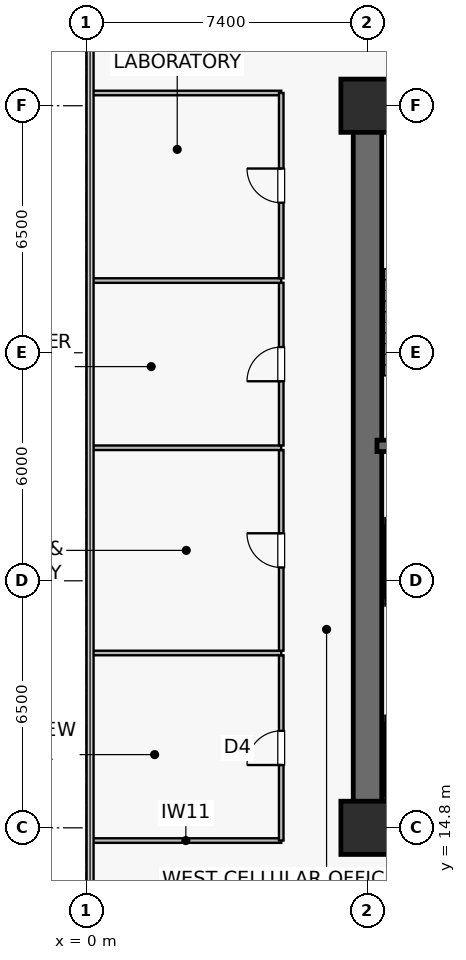
"""IFC4 building model, lengths in metres.
Left out: names, types, materials, properties, quantities, classifications, styles, units other than length and angle.
Written with IfcOpenShell. Run it as: python <this file> out.ifc"""

import sys

from ifc_helpers import new_model, si_unit, direction, frame, frame_2d, origin, origin_2d, place, context, subcontext, project, spatial, rectangle, extrude, source, transform, mapped, element, fill, save


model = new_model("IFC4")
c1 = context("Model", 3, precision=1e-05, world=origin(), true_north=direction((0.0, 1.0)))
c2 = subcontext(c1, "Body", "Model", "MODEL_VIEW")
j1 = project(units=[si_unit("LENGTHUNIT", "METRE"), si_unit("PLANEANGLEUNIT", "RADIAN")], contexts=[c1])
p1 = place(None, origin())
s1 = spatial("IfcSite", under=j1, at=p1, CompositionType="ELEMENT")
p2 = place(p1, origin())
s2 = spatial("IfcBuilding", under=s1, at=p2, CompositionType="ELEMENT")
p3 = place(p2, frame((0.0, 0.0, 90.8)))
s3 = spatial("IfcBuildingStorey", under=s2, at=p3, CompositionType="ELEMENT", Elevation=90.8)
p4 = place(p3, frame((7.025, 14.8, 0.0), z_axis=(0.0, 0.0, 1.0), x_axis=(1.0, 0.0, 0.0)))
e1 = element("IfcWall", 1, at=p4, inside=s3, PredefinedType="SHEAR", context=c2, shape_type="SweptSolid", body=[
    extrude(rectangle(XDim=15.55, YDim=0.75, at=frame_2d((7.775, 0.0))), origin(), (0.0, 0.0, 1.0), 3.78),
])
p5 = place(p3, frame((7.025, 33.8, 0.0), z_axis=(0.0, 0.0, 1.0), x_axis=(1.0, 0.0, 0.0)))
e2 = element("IfcWall", 2, at=p5, inside=s3, PredefinedType="SHEAR", context=c2, shape_type="SweptSolid", body=[
    extrude(rectangle(XDim=15.55, YDim=0.75, at=frame_2d((7.775, 0.0))), origin(), (0.0, 0.0, 1.0), 3.78),
])
p6 = place(p5, frame((6.875, 0.0, 0.0)))
e3 = element("IfcOpeningElement", 3, at=p6, cuts=e2, PredefinedType="OPENING", context=c2, shape_type="SweptSolid", body=[
    extrude(rectangle(XDim=0.95, YDim=2.15, at=frame_2d((0.475, 1.075))), frame((0.0, 0.385, 0.0), z_axis=(0.0, -1.0, 0.0), x_axis=(1.0, 0.0, 0.0)), (0.0, 0.0, 1.0), 0.77),
])
p7 = place(p5, frame((11.94, 0.0, 0.0)))
e4 = element("IfcOpeningElement", 4, at=p7, cuts=e2, PredefinedType="OPENING", context=c2, shape_type="SweptSolid", body=[
    extrude(rectangle(XDim=0.95, YDim=2.15, at=frame_2d((0.475, 1.075))), frame((0.0, 0.385, 0.0), z_axis=(0.0, -1.0, 0.0), x_axis=(1.0, 0.0, 0.0)), (0.0, 0.0, 1.0), 0.77),
])
p8 = place(p3, frame((7.4, 15.175, 0.0), z_axis=(0.0, 0.0, 1.0), x_axis=(0.0, 1.0, 0.0)))
e5 = element("IfcWall", 5, at=p8, inside=s3, PredefinedType="SHEAR", context=c2, shape_type="SweptSolid", body=[
    extrude(rectangle(XDim=18.25, YDim=0.75, at=frame_2d((9.125, 0.0))), origin(), (0.0, 0.0, 1.0), 3.78),
])
p9 = place(p3, frame((7.65, 24.85, 0.0), z_axis=(0.0, 0.0, 1.0), x_axis=(1.0, 0.0, 0.0)))
e6 = element("IfcWall", 6, at=p9, inside=s3, PredefinedType="SHEAR", context=c2, shape_type="SweptSolid", body=[
    extrude(rectangle(XDim=3.8, YDim=0.3, at=frame_2d((1.9, 0.0))), origin(), (0.0, 0.0, 1.0), 3.78),
])
p10 = place(p3, frame((7.73, 33.4, 0.0), z_axis=(0.0, 0.0, 1.0), x_axis=(1.0, 0.0, 0.0)))
e7 = element("IfcWall", 7, at=p10, inside=s3, PredefinedType="SOLIDWALL", context=c2, shape_type="SweptSolid", body=[
    extrude(rectangle(XDim=3.72, YDim=0.12, at=frame_2d((1.86, 0.0))), origin(), (0.0, 0.0, 1.0), 3.78),
])
m1 = source(origin(), c2, "Body", "SweptSolid", [
    extrude(rectangle(XDim=1.4, YDim=1.4, at=origin_2d()), origin(), (0.0, 0.0, 1.0), 4.1),
])
for number, where, z_axis, x_axis in (
    (8, (7.4, 14.8, 0.0), (0.0, 0.0, 1.0), (1.0, 0.0, 0.0)),
    (9, (7.4, 33.8, 0.0), (0.0, 0.0, 1.0), (1.0, 0.0, 0.0)),
):
    element("IfcColumn", number, at=place(p3, frame(where, z_axis=z_axis, x_axis=x_axis)), inside=s3, PredefinedType="COLUMN", context=c2, shape_type="MappedRepresentation", body=[
        mapped(m1, transform((0.0, 0.0, 0.0), scale=1.0)),
    ])
p11 = place(p3, frame((7.87, 17.65, 0.0), z_axis=(0.0, 0.0, 1.0), x_axis=(1.0, 0.0, 0.0)))
e10 = element("IfcWall", 10, at=p11, inside=s3, PredefinedType="SOLIDWALL", context=c2, shape_type="SweptSolid", body=[
    extrude(rectangle(XDim=2.26, YDim=0.2, at=frame_2d((1.13, 0.0))), origin(), (0.0, 0.0, 1.0), 3.78),
])
p12 = place(p11, frame((0.58, 0.0, 0.0)))
e11 = element("IfcOpeningElement", 11, at=p12, cuts=e10, PredefinedType="OPENING", context=c2, shape_type="SweptSolid", body=[
    extrude(rectangle(XDim=1.1, YDim=2.22, at=frame_2d((0.55, 1.11))), frame((0.0, 0.11, 0.0), z_axis=(0.0, -1.0, 0.0), x_axis=(1.0, 0.0, 0.0)), (0.0, 0.0, 1.0), 0.22),
])
p13 = place(p3, frame((7.87, 15.55, 0.0), z_axis=(0.0, 0.0, 1.0), x_axis=(1.0, 0.0, 0.0)))
e12 = element("IfcWall", 12, at=p13, inside=s3, PredefinedType="SOLIDWALL", context=c2, shape_type="SweptSolid", body=[
    extrude(rectangle(XDim=2.26, YDim=0.2, at=frame_2d((1.13, 0.0))), origin(), (0.0, 0.0, 1.0), 3.78),
])
p14 = place(p3, frame((7.95, 15.65, 0.0), z_axis=(0.0, 0.0, 1.0), x_axis=(0.0, 1.0, 0.0)))
e13 = element("IfcWall", 13, at=p14, inside=s3, PredefinedType="SOLIDWALL", context=c2, shape_type="SweptSolid", body=[
    extrude(rectangle(XDim=1.9, YDim=0.18, at=frame_2d((0.95, 0.0))), origin(), (0.0, 0.0, 1.0), 3.78),
])
for number, where, z_axis, x_axis in (
    (14, (7.87, 20.75, 0.0), (0.0, 0.0, 1.0), (1.0, 0.0, 0.0)),
    (15, (7.87, 22.85, 0.0), (0.0, 0.0, 1.0), (1.0, 0.0, 0.0)),
):
    element("IfcWall", number, at=place(p3, frame(where, z_axis=z_axis, x_axis=x_axis)), inside=s3, PredefinedType="SOLIDWALL", context=c2, shape_type="SweptSolid", body=[
        extrude(rectangle(XDim=2.26, YDim=0.2, at=frame_2d((1.13, 0.0))), origin(), (0.0, 0.0, 1.0), 3.78),
    ])
p15 = place(p3, frame((7.95, 20.85, 0.0), z_axis=(0.0, 0.0, 1.0), x_axis=(0.0, 1.0, 0.0)))
e16 = element("IfcWall", 16, at=p15, inside=s3, PredefinedType="SOLIDWALL", context=c2, shape_type="SweptSolid", body=[
    extrude(rectangle(XDim=1.9, YDim=0.18, at=frame_2d((0.95, 0.0))), origin(), (0.0, 0.0, 1.0), 3.78),
])
for number, where, z_axis, x_axis in (
    (17, (0.11, 14.465, 0.0), (0.0, 0.0, 1.0), (1.0, 0.0, 0.0)),
    (18, (0.11, 34.135, 0.0), (0.0, 0.0, 1.0), (1.0, 0.0, 0.0)),
):
    element("IfcWall", number, at=place(p3, frame(where, z_axis=z_axis, x_axis=x_axis)), inside=s3, PredefinedType="PARTITIONING", context=c2, shape_type="SweptSolid", body=[
        extrude(rectangle(XDim=5.02, YDim=0.12, at=frame_2d((2.51, 0.0))), origin(), (0.0, 0.0, 1.0), 3.78),
    ])
p16 = place(p3, frame((5.13, 14.465, 0.0), z_axis=(0.0, 0.0, 1.0), x_axis=(0.0, 1.0, 0.0)))
e19 = element("IfcWall", 19, at=p16, inside=s3, PredefinedType="PARTITIONING", context=c2, shape_type="SweptSolid", body=[
    extrude(rectangle(XDim=4.875, YDim=0.12, at=frame_2d((2.438, 0.0))), origin(), (0.0, 0.0, 1.0), 3.78),
])
p17 = place(p16, frame((1.988, 0.0, 0.0)))
e20 = element("IfcOpeningElement", 20, at=p17, cuts=e19, PredefinedType="OPENING", context=c2, shape_type="SweptSolid", body=[
    extrude(rectangle(XDim=0.9, YDim=2.1, at=frame_2d((0.45, 1.05))), frame((0.0, 0.07, 0.0), z_axis=(0.0, -1.0, 0.0), x_axis=(1.0, 0.0, 0.0)), (0.0, 0.0, 1.0), 0.14),
])
p18 = place(p3, frame((0.11, 19.4, 0.0), z_axis=(0.0, 0.0, 1.0), x_axis=(1.0, 0.0, 0.0)))
e21 = element("IfcWall", 21, at=p18, inside=s3, PredefinedType="PARTITIONING", context=c2, shape_type="SweptSolid", body=[
    extrude(rectangle(XDim=5.02, YDim=0.12, at=frame_2d((2.51, 0.0))), origin(), (0.0, 0.0, 1.0), 3.78),
])
p19 = place(p3, frame((5.13, 19.46, 0.0), z_axis=(0.0, 0.0, 1.0), x_axis=(0.0, 1.0, 0.0)))
e22 = element("IfcWall", 22, at=p19, inside=s3, PredefinedType="PARTITIONING", context=c2, shape_type="SweptSolid", body=[
    extrude(rectangle(XDim=5.28, YDim=0.12, at=frame_2d((2.64, 0.0))), origin(), (0.0, 0.0, 1.0), 3.78),
])
p20 = place(p19, frame((2.19, 0.0, 0.0)))
e23 = element("IfcOpeningElement", 23, at=p20, cuts=e22, PredefinedType="OPENING", context=c2, shape_type="SweptSolid", body=[
    extrude(rectangle(XDim=0.9, YDim=2.1, at=frame_2d((0.45, 1.05))), frame((0.0, 0.07, 0.0), z_axis=(0.0, -1.0, 0.0), x_axis=(1.0, 0.0, 0.0)), (0.0, 0.0, 1.0), 0.14),
])
p21 = place(p3, frame((0.11, 24.8, 0.0), z_axis=(0.0, 0.0, 1.0), x_axis=(1.0, 0.0, 0.0)))
e24 = element("IfcWall", 24, at=p21, inside=s3, PredefinedType="PARTITIONING", context=c2, shape_type="SweptSolid", body=[
    extrude(rectangle(XDim=5.02, YDim=0.12, at=frame_2d((2.51, 0.0))), origin(), (0.0, 0.0, 1.0), 3.78),
])
p22 = place(p3, frame((5.13, 24.86, 0.0), z_axis=(0.0, 0.0, 1.0), x_axis=(0.0, 1.0, 0.0)))
e25 = element("IfcWall", 25, at=p22, inside=s3, PredefinedType="PARTITIONING", context=c2, shape_type="SweptSolid", body=[
    extrude(rectangle(XDim=4.28, YDim=0.12, at=frame_2d((2.14, 0.0))), origin(), (0.0, 0.0, 1.0), 3.78),
])
p23 = place(p22, frame((1.69, 0.0, 0.0)))
e26 = element("IfcOpeningElement", 26, at=p23, cuts=e25, PredefinedType="OPENING", context=c2, shape_type="SweptSolid", body=[
    extrude(rectangle(XDim=0.9, YDim=2.1, at=frame_2d((0.45, 1.05))), frame((0.0, 0.07, 0.0), z_axis=(0.0, -1.0, 0.0), x_axis=(1.0, 0.0, 0.0)), (0.0, 0.0, 1.0), 0.14),
])
p24 = place(p3, frame((0.11, 29.2, 0.0), z_axis=(0.0, 0.0, 1.0), x_axis=(1.0, 0.0, 0.0)))
e27 = element("IfcWall", 27, at=p24, inside=s3, PredefinedType="PARTITIONING", context=c2, shape_type="SweptSolid", body=[
    extrude(rectangle(XDim=5.02, YDim=0.12, at=frame_2d((2.51, 0.0))), origin(), (0.0, 0.0, 1.0), 3.78),
])
p25 = place(p3, frame((5.13, 29.26, 0.0), z_axis=(0.0, 0.0, 1.0), x_axis=(0.0, 1.0, 0.0)))
e28 = element("IfcWall", 28, at=p25, inside=s3, PredefinedType="PARTITIONING", context=c2, shape_type="SweptSolid", body=[
    extrude(rectangle(XDim=4.875, YDim=0.12, at=frame_2d((2.438, 0.0))), origin(), (0.0, 0.0, 1.0), 3.78),
])
p26 = place(p25, frame((1.988, 0.0, 0.0)))
e29 = element("IfcOpeningElement", 29, at=p26, cuts=e28, PredefinedType="OPENING", context=c2, shape_type="SweptSolid", body=[
    extrude(rectangle(XDim=0.9, YDim=2.1, at=frame_2d((0.45, 1.05))), frame((0.0, 0.07, 0.0), z_axis=(0.0, -1.0, 0.0), x_axis=(1.0, 0.0, 0.0)), (0.0, 0.0, 1.0), 0.14),
])
m2 = source(origin(), c2, "Body", "SweptSolid", [
    extrude(rectangle(XDim=0.9, YDim=2.1, at=frame_2d((0.45, 1.05))), frame((0.0, 0.025, 0.0), z_axis=(0.0, -1.0, 0.0), x_axis=(1.0, 0.0, 0.0)), (0.0, 0.0, 1.0), 0.05),
])
p27 = place(p17, origin())
e30 = element("IfcDoor", 30, at=p27, inside=s3, OperationType="SINGLE_SWING_LEFT", PredefinedType="DOOR", context=c2, shape_type="MappedRepresentation", body=[
    mapped(m2, transform((0.0, 0.0, 0.0), scale=1.0)),
])
fill(e20, e30)
p28 = place(p20, origin())
e31 = element("IfcDoor", 31, at=p28, inside=s3, OperationType="SINGLE_SWING_RIGHT", PredefinedType="DOOR", context=c2, shape_type="MappedRepresentation", body=[
    mapped(m2, transform((0.0, 0.0, 0.0), scale=1.0)),
])
fill(e23, e31)
p29 = place(p23, origin())
e32 = element("IfcDoor", 32, at=p29, inside=s3, OperationType="SINGLE_SWING_LEFT", PredefinedType="DOOR", context=c2, shape_type="MappedRepresentation", body=[
    mapped(m2, transform((0.0, 0.0, 0.0), scale=1.0)),
])
fill(e26, e32)
p30 = place(p26, origin())
e33 = element("IfcDoor", 33, at=p30, inside=s3, OperationType="SINGLE_SWING_RIGHT", PredefinedType="DOOR", context=c2, shape_type="MappedRepresentation", body=[
    mapped(m2, transform((0.0, 0.0, 0.0), scale=1.0)),
])
fill(e29, e33)
save(model, sys.argv[1])
